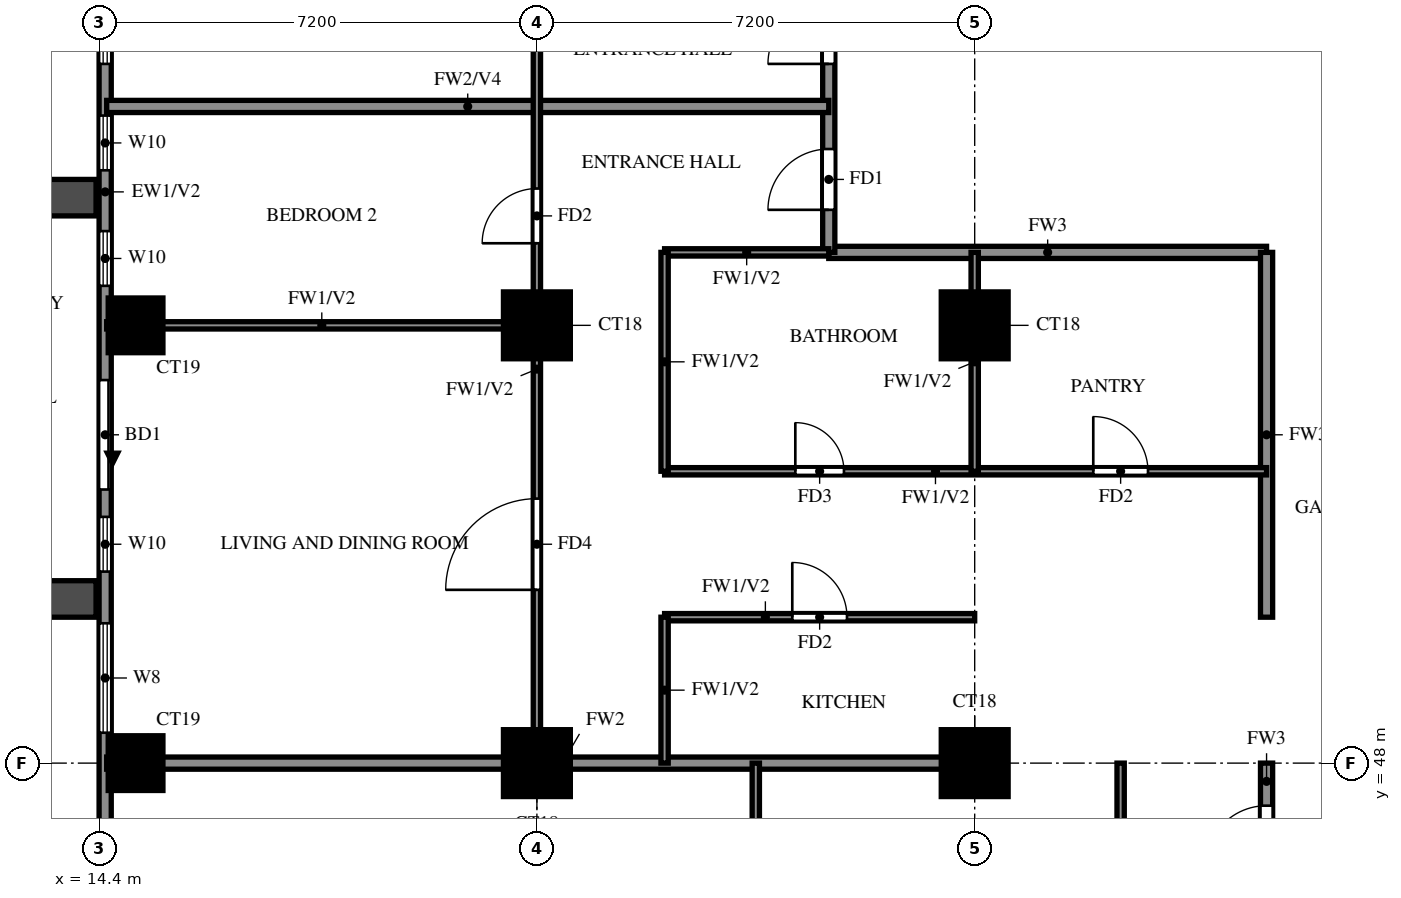
"""IFC4 building model, lengths in metres.
Left out: names, types, materials, properties, quantities, classifications, styles, units other than length and angle.
Written with IfcOpenShell. Run it as: python <this file> out.ifc"""

import sys

from ifc_helpers import new_model, si_unit, direction, frame, frame_2d, origin, origin_2d, place, context, subcontext, project, spatial, rectangle, extrude, source, transform, mapped, element, fill, save


model = new_model("IFC4")
c1 = context("Model", 3, precision=1e-05, world=origin(), true_north=direction((0.0, 1.0)))
c2 = subcontext(c1, "Body", "Model", "MODEL_VIEW")
j1 = project(units=[si_unit("LENGTHUNIT", "METRE"), si_unit("PLANEANGLEUNIT", "RADIAN")], contexts=[c1])
p1 = place(None, origin())
s1 = spatial("IfcSite", under=j1, at=p1, CompositionType="ELEMENT")
p2 = place(p1, origin())
s2 = spatial("IfcBuilding", under=s1, at=p2, CompositionType="ELEMENT")
p3 = place(p2, frame((0.0, 0.0, 127.0)))
s3 = spatial("IfcBuildingStorey", under=s2, at=p3, CompositionType="ELEMENT", Elevation=127.0)
m1 = source(origin(), c2, "Body", "SweptSolid", [
    extrude(rectangle(XDim=0.9, YDim=0.9, at=origin_2d()), origin(), (0.0, 0.0, 1.0), 3.2),
])
p4 = place(p3, frame((15.0, 48.0, 0.0), z_axis=(0.0, 0.0, 1.0), x_axis=(1.0, 0.0, 0.0)))
e1 = element("IfcColumn", 1, at=p4, inside=s3, PredefinedType="COLUMN", context=c2, shape_type="MappedRepresentation", body=[
    mapped(m1, transform((0.0, 0.0, 0.0))),
])
m2 = source(origin(), c2, "Body", "SweptSolid", [
    extrude(rectangle(XDim=1.1, YDim=1.1, at=origin_2d()), origin(), (0.0, 0.0, 1.0), 3.2),
])
for number, where, z_axis, x_axis in (
    (2, (21.6, 48.0, 0.0), (0.0, 0.0, 1.0), (1.0, 0.0, 0.0)),
    (3, (28.8, 48.0, 0.0), (0.0, 0.0, 1.0), (1.0, 0.0, 0.0)),
):
    element("IfcColumn", number, at=place(p3, frame(where, z_axis=z_axis, x_axis=x_axis)), inside=s3, PredefinedType="COLUMN", context=c2, shape_type="MappedRepresentation", body=[
        mapped(m2, transform((0.0, 0.0, 0.0))),
    ])
p5 = place(p3, frame((15.0, 55.2, 0.0), z_axis=(0.0, 0.0, 1.0), x_axis=(1.0, 0.0, 0.0)))
e4 = element("IfcColumn", 4, at=p5, inside=s3, PredefinedType="COLUMN", context=c2, shape_type="MappedRepresentation", body=[
    mapped(m1, transform((0.0, 0.0, 0.0))),
])
for number, where, z_axis, x_axis in (
    (5, (21.6, 55.2, 0.0), (0.0, 0.0, 1.0), (1.0, 0.0, 0.0)),
    (6, (28.8, 55.2, 0.0), (0.0, 0.0, 1.0), (1.0, 0.0, 0.0)),
):
    element("IfcColumn", number, at=place(p3, frame(where, z_axis=z_axis, x_axis=x_axis)), inside=s3, PredefinedType="COLUMN", context=c2, shape_type="MappedRepresentation", body=[
        mapped(m2, transform((0.0, 0.0, 0.0))),
    ])
p6 = place(p3, frame((14.5, 76.6, 0.0), z_axis=(0.0, 0.0, 1.0), x_axis=(0.0, -1.0, 0.0)))
e7 = element("IfcWall", 7, at=p6, inside=s3, PredefinedType="SOLIDWALL", context=c2, shape_type="SweptSolid", body=[
    extrude(rectangle(XDim=33.4, YDim=0.2, at=frame_2d((16.7, 0.0))), origin(), (0.0, 0.0, 1.0), 3.2),
])
p7 = place(p6, frame((7.9, 0.0, 0.0)))
e8 = element("IfcOpeningElement", 8, at=p7, cuts=e7, PredefinedType="OPENING", context=c2, shape_type="SweptSolid", body=[
    extrude(rectangle(XDim=1.8, YDim=2.4, at=frame_2d((0.9, 1.2))), frame((0.0, 0.11, 0.0), z_axis=(0.0, -1.0, 0.0), x_axis=(1.0, 0.0, 0.0)), (0.0, 0.0, 1.0), 0.22),
])
p8 = place(p6, frame((22.3, 0.0, 0.0)))
e9 = element("IfcOpeningElement", 9, at=p8, cuts=e7, PredefinedType="OPENING", context=c2, shape_type="SweptSolid", body=[
    extrude(rectangle(XDim=1.8, YDim=2.4, at=frame_2d((0.9, 1.2))), frame((0.0, 0.11, 0.0), z_axis=(0.0, -1.0, 0.0), x_axis=(1.0, 0.0, 0.0)), (0.0, 0.0, 1.0), 0.22),
])
p9 = place(p6, frame((29.9, 0.0, 0.6)))
e10 = element("IfcOpeningElement", 10, at=p9, cuts=e7, PredefinedType="OPENING", context=c2, shape_type="SweptSolid", body=[
    extrude(rectangle(XDim=2.4, YDim=2.4, at=frame_2d((1.2, 1.2))), frame((0.0, 0.11, 0.0), z_axis=(0.0, -1.0, 0.0), x_axis=(1.0, 0.0, 0.0)), (0.0, 0.0, 1.0), 0.22),
])
p10 = place(p6, frame((24.55, 0.0, 0.6)))
e11 = element("IfcOpeningElement", 11, at=p10, cuts=e7, PredefinedType="OPENING", context=c2, shape_type="SweptSolid", body=[
    extrude(rectangle(XDim=0.9, YDim=2.4, at=frame_2d((0.45, 1.2))), frame((0.0, 0.11, 0.0), z_axis=(0.0, -1.0, 0.0), x_axis=(1.0, 0.0, 0.0)), (0.0, 0.0, 1.0), 0.22),
])
p11 = place(p6, frame((26.3, 0.0, 0.6)))
e12 = element("IfcOpeningElement", 12, at=p11, cuts=e7, PredefinedType="OPENING", context=c2, shape_type="SweptSolid", body=[
    extrude(rectangle(XDim=1.8, YDim=2.4, at=frame_2d((0.9, 1.2))), frame((0.0, 0.11, 0.0), z_axis=(0.0, -1.0, 0.0), x_axis=(1.0, 0.0, 0.0)), (0.0, 0.0, 1.0), 0.22),
])
p12 = place(p6, frame((17.95, 0.0, 0.6)))
e13 = element("IfcOpeningElement", 13, at=p12, cuts=e7, PredefinedType="OPENING", context=c2, shape_type="SweptSolid", body=[
    extrude(rectangle(XDim=0.9, YDim=2.4, at=frame_2d((0.45, 1.2))), frame((0.0, 0.11, 0.0), z_axis=(0.0, -1.0, 0.0), x_axis=(1.0, 0.0, 0.0)), (0.0, 0.0, 1.0), 0.22),
])
p13 = place(p6, frame((19.85, 0.0, 0.6)))
e14 = element("IfcOpeningElement", 14, at=p13, cuts=e7, PredefinedType="OPENING", context=c2, shape_type="SweptSolid", body=[
    extrude(rectangle(XDim=0.9, YDim=2.4, at=frame_2d((0.45, 1.2))), frame((0.0, 0.11, 0.0), z_axis=(0.0, -1.0, 0.0), x_axis=(1.0, 0.0, 0.0)), (0.0, 0.0, 1.0), 0.22),
])
p14 = place(p6, frame((15.3, 0.0, 0.6)))
e15 = element("IfcOpeningElement", 15, at=p14, cuts=e7, PredefinedType="OPENING", context=c2, shape_type="SweptSolid", body=[
    extrude(rectangle(XDim=1.8, YDim=2.4, at=frame_2d((0.9, 1.2))), frame((0.0, 0.11, 0.0), z_axis=(0.0, -1.0, 0.0), x_axis=(1.0, 0.0, 0.0)), (0.0, 0.0, 1.0), 0.22),
])
p15 = place(p6, frame((12.35, 0.0, 1.5)))
e16 = element("IfcOpeningElement", 16, at=p15, cuts=e7, PredefinedType="OPENING", context=c2, shape_type="SweptSolid", body=[
    extrude(rectangle(XDim=0.9, YDim=0.9, at=frame_2d((0.45, 0.45))), frame((0.0, 0.11, 0.0), z_axis=(0.0, -1.0, 0.0), x_axis=(1.0, 0.0, 0.0)), (0.0, 0.0, 1.0), 0.22),
])
p16 = place(p6, frame((3.55, 0.0, 0.6)))
e17 = element("IfcOpeningElement", 17, at=p16, cuts=e7, PredefinedType="OPENING", context=c2, shape_type="SweptSolid", body=[
    extrude(rectangle(XDim=0.9, YDim=2.4, at=frame_2d((0.45, 1.2))), frame((0.0, 0.11, 0.0), z_axis=(0.0, -1.0, 0.0), x_axis=(1.0, 0.0, 0.0)), (0.0, 0.0, 1.0), 0.22),
])
p17 = place(p6, frame((5.3, 0.0, 0.6)))
e18 = element("IfcOpeningElement", 18, at=p17, cuts=e7, PredefinedType="OPENING", context=c2, shape_type="SweptSolid", body=[
    extrude(rectangle(XDim=1.2, YDim=2.4, at=frame_2d((0.6, 1.2))), frame((0.0, 0.11, 0.0), z_axis=(0.0, -1.0, 0.0), x_axis=(1.0, 0.0, 0.0)), (0.0, 0.0, 1.0), 0.22),
])
p18 = place(p6, frame((0.6, 0.0, 0.6)))
e19 = element("IfcOpeningElement", 19, at=p18, cuts=e7, PredefinedType="OPENING", context=c2, shape_type="SweptSolid", body=[
    extrude(rectangle(XDim=2.4, YDim=2.4, at=frame_2d((1.2, 1.2))), frame((0.0, 0.11, 0.0), z_axis=(0.0, -1.0, 0.0), x_axis=(1.0, 0.0, 0.0)), (0.0, 0.0, 1.0), 0.22),
])
for number, where, z_axis, x_axis in (
    (20, (14.35, 57.3, 0.0), (0.0, 0.0, 1.0), (-1.0, 0.0, 0.0)),
    (21, (14.35, 50.7, 0.0), (0.0, 0.0, 1.0), (-1.0, 0.0, 0.0)),
):
    element("IfcWall", number, at=place(p3, frame(where, z_axis=z_axis, x_axis=x_axis)), inside=s3, PredefinedType="SOLIDWALL", context=c2, shape_type="SweptSolid", body=[
        extrude(rectangle(XDim=2.65, YDim=0.6, at=frame_2d((1.325, 0.0))), origin(), (0.0, 0.0, 1.0), 2.85),
    ])
p19 = place(p3, frame((26.4, 56.4, 0.0), z_axis=(0.0, 0.0, 1.0), x_axis=(1.0, 0.0, 0.0)))
e22 = element("IfcWall", 22, at=p19, inside=s3, PredefinedType="SOLIDWALL", context=c2, shape_type="SweptSolid", body=[
    extrude(rectangle(XDim=7.2, YDim=0.2, at=frame_2d((3.6, 0.0))), origin(), (0.0, 0.0, 1.0), 3.2),
])
p20 = place(p3, frame((26.4, 56.4, 0.0), z_axis=(0.0, 0.0, 1.0), x_axis=(0.0, 1.0, 0.0)))
e23 = element("IfcWall", 23, at=p20, inside=s3, PredefinedType="SOLIDWALL", context=c2, shape_type="SweptSolid", body=[
    extrude(rectangle(XDim=9.6, YDim=0.2, at=frame_2d((4.8, 0.0))), origin(), (0.0, 0.0, 1.0), 3.2),
])
p21 = place(p20, frame((0.7, 0.0, 0.0)))
e24 = element("IfcOpeningElement", 24, at=p21, cuts=e23, PredefinedType="OPENING", context=c2, shape_type="SweptSolid", body=[
    extrude(rectangle(XDim=1.0, YDim=2.1, at=frame_2d((0.5, 1.05))), frame((0.0, 0.11, 0.0), z_axis=(0.0, -1.0, 0.0), x_axis=(1.0, 0.0, 0.0)), (0.0, 0.0, 1.0), 0.22),
])
p22 = place(p20, frame((3.1, 0.0, 0.0)))
e25 = element("IfcOpeningElement", 25, at=p22, cuts=e23, PredefinedType="OPENING", context=c2, shape_type="SweptSolid", body=[
    extrude(rectangle(XDim=1.0, YDim=2.1, at=frame_2d((0.5, 1.05))), frame((0.0, 0.11, 0.0), z_axis=(0.0, -1.0, 0.0), x_axis=(1.0, 0.0, 0.0)), (0.0, 0.0, 1.0), 0.22),
])
p23 = place(p3, frame((33.6, 45.6, 0.0), z_axis=(0.0, 0.0, 1.0), x_axis=(0.0, 1.0, 0.0)))
e26 = element("IfcWall", 26, at=p23, inside=s3, PredefinedType="SOLIDWALL", context=c2, shape_type="SweptSolid", body=[
    extrude(rectangle(XDim=2.4, YDim=0.2, at=frame_2d((1.2, 0.0))), origin(), (0.0, 0.0, 1.0), 3.2),
])
p24 = place(p23, frame((0.7, 0.0, 0.0)))
e27 = element("IfcOpeningElement", 27, at=p24, cuts=e26, PredefinedType="OPENING", context=c2, shape_type="SweptSolid", body=[
    extrude(rectangle(XDim=1.0, YDim=2.1, at=frame_2d((0.5, 1.05))), frame((0.0, 0.11, 0.0), z_axis=(0.0, -1.0, 0.0), x_axis=(1.0, 0.0, 0.0)), (0.0, 0.0, 1.0), 0.22),
])
p25 = place(p3, frame((33.6, 50.4, 0.0), z_axis=(0.0, 0.0, 1.0), x_axis=(0.0, 1.0, 0.0)))
e28 = element("IfcWall", 28, at=p25, inside=s3, PredefinedType="SOLIDWALL", context=c2, shape_type="SweptSolid", body=[
    extrude(rectangle(XDim=6.0, YDim=0.2, at=frame_2d((3.0, 0.0))), origin(), (0.0, 0.0, 1.0), 3.2),
])
p26 = place(p3, frame((14.525, 48.0, 0.0), z_axis=(0.0, 0.0, 1.0), x_axis=(1.0, 0.0, 0.0)))
e29 = element("IfcWall", 29, at=p26, inside=s3, PredefinedType="SOLIDWALL", context=c2, shape_type="SweptSolid", body=[
    extrude(rectangle(XDim=14.275, YDim=0.2, at=frame_2d((7.138, 0.0))), origin(), (0.0, 0.0, 1.0), 3.2),
])
p27 = place(p3, frame((14.525, 58.8, 0.0), z_axis=(0.0, 0.0, 1.0), x_axis=(1.0, 0.0, 0.0)))
e30 = element("IfcWall", 30, at=p27, inside=s3, PredefinedType="SOLIDWALL", context=c2, shape_type="SweptSolid", body=[
    extrude(rectangle(XDim=11.875, YDim=0.2, at=frame_2d((5.938, 0.0))), origin(), (0.0, 0.0, 1.0), 2.3),
])
p28 = place(p3, frame((23.7, 50.4, 0.0), z_axis=(0.0, 0.0, 1.0), x_axis=(1.0, 0.0, 0.0)))
e31 = element("IfcWall", 31, at=p28, inside=s3, PredefinedType="PARTITIONING", context=c2, shape_type="SweptSolid", body=[
    extrude(rectangle(XDim=5.1, YDim=0.12, at=frame_2d((2.55, 0.0))), origin(), (0.0, 0.0, 1.0), 3.2),
])
p29 = place(p28, frame((2.1, 0.0, 0.0)))
e32 = element("IfcOpeningElement", 32, at=p29, cuts=e31, PredefinedType="OPENING", context=c2, shape_type="SweptSolid", body=[
    extrude(rectangle(XDim=0.9, YDim=2.1, at=frame_2d((0.45, 1.05))), frame((0.0, 0.07, 0.0), z_axis=(0.0, -1.0, 0.0), x_axis=(1.0, 0.0, 0.0)), (0.0, 0.0, 1.0), 0.14),
])
p30 = place(p3, frame((23.7, 52.8, 0.0), z_axis=(0.0, 0.0, 1.0), x_axis=(1.0, 0.0, 0.0)))
e33 = element("IfcWall", 33, at=p30, inside=s3, PredefinedType="PARTITIONING", context=c2, shape_type="SweptSolid", body=[
    extrude(rectangle(XDim=9.9, YDim=0.12, at=frame_2d((4.95, 0.0))), origin(), (0.0, 0.0, 1.0), 3.2),
])
p31 = place(p30, frame((2.15, 0.0, 0.0)))
e34 = element("IfcOpeningElement", 34, at=p31, cuts=e33, PredefinedType="OPENING", context=c2, shape_type="SweptSolid", body=[
    extrude(rectangle(XDim=0.8, YDim=2.1, at=frame_2d((0.4, 1.05))), frame((0.0, 0.07, 0.0), z_axis=(0.0, -1.0, 0.0), x_axis=(1.0, 0.0, 0.0)), (0.0, 0.0, 1.0), 0.14),
])
p32 = place(p30, frame((7.05, 0.0, 0.0)))
e35 = element("IfcOpeningElement", 35, at=p32, cuts=e33, PredefinedType="OPENING", context=c2, shape_type="SweptSolid", body=[
    extrude(rectangle(XDim=0.9, YDim=2.1, at=frame_2d((0.45, 1.05))), frame((0.0, 0.07, 0.0), z_axis=(0.0, -1.0, 0.0), x_axis=(1.0, 0.0, 0.0)), (0.0, 0.0, 1.0), 0.14),
])
p33 = place(p3, frame((14.525, 55.2, 0.0), z_axis=(0.0, 0.0, 1.0), x_axis=(1.0, 0.0, 0.0)))
e36 = element("IfcWall", 36, at=p33, inside=s3, PredefinedType="PARTITIONING", context=c2, shape_type="SweptSolid", body=[
    extrude(rectangle(XDim=7.075, YDim=0.12, at=frame_2d((3.538, 0.0))), origin(), (0.0, 0.0, 1.0), 3.2),
])
p34 = place(p3, frame((23.7, 56.4, 0.0), z_axis=(0.0, 0.0, 1.0), x_axis=(1.0, 0.0, 0.0)))
e37 = element("IfcWall", 37, at=p34, inside=s3, PredefinedType="PARTITIONING", context=c2, shape_type="SweptSolid", body=[
    extrude(rectangle(XDim=2.7, YDim=0.12, at=frame_2d((1.35, 0.0))), origin(), (0.0, 0.0, 1.0), 3.2),
])
p35 = place(p3, frame((21.6, 48.0, 0.0), z_axis=(0.0, 0.0, 1.0), x_axis=(0.0, 1.0, 0.0)))
e38 = element("IfcWall", 38, at=p35, inside=s3, PredefinedType="PARTITIONING", context=c2, shape_type="SweptSolid", body=[
    extrude(rectangle(XDim=14.4, YDim=0.12, at=frame_2d((7.2, 0.0))), origin(), (0.0, 0.0, 1.0), 3.2),
])
p36 = place(p35, frame((2.85, 0.0, 0.0)))
e39 = element("IfcOpeningElement", 39, at=p36, cuts=e38, PredefinedType="OPENING", context=c2, shape_type="SweptSolid", body=[
    extrude(rectangle(XDim=1.5, YDim=2.1, at=frame_2d((0.75, 1.05))), frame((0.0, 0.07, 0.0), z_axis=(0.0, -1.0, 0.0), x_axis=(1.0, 0.0, 0.0)), (0.0, 0.0, 1.0), 0.14),
])
p37 = place(p35, frame((8.55, 0.0, 0.0)))
e40 = element("IfcOpeningElement", 40, at=p37, cuts=e38, PredefinedType="OPENING", context=c2, shape_type="SweptSolid", body=[
    extrude(rectangle(XDim=0.9, YDim=2.1, at=frame_2d((0.45, 1.05))), frame((0.0, 0.07, 0.0), z_axis=(0.0, -1.0, 0.0), x_axis=(1.0, 0.0, 0.0)), (0.0, 0.0, 1.0), 0.14),
])
p38 = place(p35, frame((12.15, 0.0, 0.0)))
e41 = element("IfcOpeningElement", 41, at=p38, cuts=e38, PredefinedType="OPENING", context=c2, shape_type="SweptSolid", body=[
    extrude(rectangle(XDim=0.9, YDim=2.1, at=frame_2d((0.45, 1.05))), frame((0.0, 0.07, 0.0), z_axis=(0.0, -1.0, 0.0), x_axis=(1.0, 0.0, 0.0)), (0.0, 0.0, 1.0), 0.14),
])
p39 = place(p3, frame((23.7, 48.0, 0.0), z_axis=(0.0, 0.0, 1.0), x_axis=(0.0, 1.0, 0.0)))
e42 = element("IfcWall", 42, at=p39, inside=s3, PredefinedType="PARTITIONING", context=c2, shape_type="SweptSolid", body=[
    extrude(rectangle(XDim=2.4, YDim=0.12, at=frame_2d((1.2, 0.0))), origin(), (0.0, 0.0, 1.0), 3.2),
])
p40 = place(p3, frame((23.7, 52.8, 0.0), z_axis=(0.0, 0.0, 1.0), x_axis=(0.0, 1.0, 0.0)))
e43 = element("IfcWall", 43, at=p40, inside=s3, PredefinedType="PARTITIONING", context=c2, shape_type="SweptSolid", body=[
    extrude(rectangle(XDim=3.6, YDim=0.12, at=frame_2d((1.8, 0.0))), origin(), (0.0, 0.0, 1.0), 3.2),
])
p41 = place(p3, frame((25.2, 39.725, 0.0), z_axis=(0.0, 0.0, 1.0), x_axis=(0.0, 1.0, 0.0)))
e44 = element("IfcWall", 44, at=p41, inside=s3, PredefinedType="PARTITIONING", context=c2, shape_type="SweptSolid", body=[
    extrude(rectangle(XDim=8.275, YDim=0.12, at=frame_2d((4.137, 0.0))), origin(), (0.0, 0.0, 1.0), 3.2),
])
p42 = place(p41, frame((4.525, 0.0, 0.0)))
e45 = element("IfcOpeningElement", 45, at=p42, cuts=e44, PredefinedType="OPENING", context=c2, shape_type="SweptSolid", body=[
    extrude(rectangle(XDim=0.9, YDim=2.1, at=frame_2d((0.45, 1.05))), frame((0.0, 0.07, 0.0), z_axis=(0.0, -1.0, 0.0), x_axis=(1.0, 0.0, 0.0)), (0.0, 0.0, 1.0), 0.14),
])
p43 = place(p3, frame((28.8, 52.8, 0.0), z_axis=(0.0, 0.0, 1.0), x_axis=(0.0, 1.0, 0.0)))
e46 = element("IfcWall", 46, at=p43, inside=s3, PredefinedType="PARTITIONING", context=c2, shape_type="SweptSolid", body=[
    extrude(rectangle(XDim=3.6, YDim=0.12, at=frame_2d((1.8, 0.0))), origin(), (0.0, 0.0, 1.0), 3.2),
])
p44 = place(p3, frame((31.2, 45.6, 0.0), z_axis=(0.0, 0.0, 1.0), x_axis=(0.0, 1.0, 0.0)))
e47 = element("IfcWall", 47, at=p44, inside=s3, PredefinedType="PARTITIONING", context=c2, shape_type="SweptSolid", body=[
    extrude(rectangle(XDim=2.4, YDim=0.12, at=frame_2d((1.2, 0.0))), origin(), (0.0, 0.0, 1.0), 3.2),
])
p45 = place(p8, origin())
e48 = element("IfcDoor", 48, at=p45, inside=s3, OperationType="DOUBLE_DOOR_SLIDING", PredefinedType="DOOR", context=c2, shape_type="SweptSolid", body=[
    extrude(rectangle(XDim=1.8, YDim=2.4, at=frame_2d((0.9, 1.2))), frame((0.0, 0.025, 0.0), z_axis=(0.0, -1.0, 0.0), x_axis=(1.0, 0.0, 0.0)), (0.0, 0.0, 1.0), 0.05),
])
fill(e9, e48)
p46 = place(p10, origin())
e49 = element("IfcWindow", 49, at=p46, inside=s3, PartitioningType="SINGLE_PANEL", PredefinedType="WINDOW", context=c2, shape_type="SweptSolid", body=[
    extrude(rectangle(XDim=0.9, YDim=2.4, at=frame_2d((0.45, 1.2))), frame((0.0, 0.03, 0.0), z_axis=(0.0, -1.0, 0.0), x_axis=(1.0, 0.0, 0.0)), (0.0, 0.0, 1.0), 0.06),
])
fill(e11, e49)
p47 = place(p11, origin())
e50 = element("IfcWindow", 50, at=p47, inside=s3, PartitioningType="DOUBLE_PANEL_VERTICAL", PredefinedType="WINDOW", context=c2, shape_type="SweptSolid", body=[
    extrude(rectangle(XDim=1.8, YDim=2.4, at=frame_2d((0.9, 1.2))), frame((0.0, 0.03, 0.0), z_axis=(0.0, -1.0, 0.0), x_axis=(1.0, 0.0, 0.0)), (0.0, 0.0, 1.0), 0.06),
])
fill(e12, e50)
p48 = place(p12, origin())
e51 = element("IfcWindow", 51, at=p48, inside=s3, PartitioningType="SINGLE_PANEL", PredefinedType="WINDOW", context=c2, shape_type="SweptSolid", body=[
    extrude(rectangle(XDim=0.9, YDim=2.4, at=frame_2d((0.45, 1.2))), frame((0.0, 0.03, 0.0), z_axis=(0.0, -1.0, 0.0), x_axis=(1.0, 0.0, 0.0)), (0.0, 0.0, 1.0), 0.06),
])
fill(e13, e51)
p49 = place(p13, origin())
e52 = element("IfcWindow", 52, at=p49, inside=s3, PartitioningType="SINGLE_PANEL", PredefinedType="WINDOW", context=c2, shape_type="SweptSolid", body=[
    extrude(rectangle(XDim=0.9, YDim=2.4, at=frame_2d((0.45, 1.2))), frame((0.0, 0.03, 0.0), z_axis=(0.0, -1.0, 0.0), x_axis=(1.0, 0.0, 0.0)), (0.0, 0.0, 1.0), 0.06),
])
fill(e14, e52)
p50 = place(p14, origin())
e53 = element("IfcWindow", 53, at=p50, inside=s3, PartitioningType="DOUBLE_PANEL_VERTICAL", PredefinedType="WINDOW", context=c2, shape_type="SweptSolid", body=[
    extrude(rectangle(XDim=1.8, YDim=2.4, at=frame_2d((0.9, 1.2))), frame((0.0, 0.03, 0.0), z_axis=(0.0, -1.0, 0.0), x_axis=(1.0, 0.0, 0.0)), (0.0, 0.0, 1.0), 0.06),
])
fill(e15, e53)
p51 = place(p24, origin())
e54 = element("IfcDoor", 54, at=p51, inside=s3, OperationType="SINGLE_SWING_RIGHT", PredefinedType="DOOR", context=c2, shape_type="SweptSolid", body=[
    extrude(rectangle(XDim=1.0, YDim=2.1, at=frame_2d((0.5, 1.05))), frame((0.0, 0.025, 0.0), z_axis=(0.0, -1.0, 0.0), x_axis=(1.0, 0.0, 0.0)), (0.0, 0.0, 1.0), 0.05),
])
fill(e27, e54)
p52 = place(p21, origin())
e55 = element("IfcDoor", 55, at=p52, inside=s3, OperationType="SINGLE_SWING_RIGHT", PredefinedType="DOOR", context=c2, shape_type="SweptSolid", body=[
    extrude(rectangle(XDim=1.0, YDim=2.1, at=frame_2d((0.5, 1.05))), frame((0.0, 0.025, 0.0), z_axis=(0.0, -1.0, 0.0), x_axis=(1.0, 0.0, 0.0)), (0.0, 0.0, 1.0), 0.05),
])
fill(e24, e55)
p53 = place(p36, origin())
e56 = element("IfcDoor", 56, at=p53, inside=s3, OperationType="SINGLE_SWING_LEFT", PredefinedType="DOOR", context=c2, shape_type="SweptSolid", body=[
    extrude(rectangle(XDim=1.5, YDim=2.1, at=frame_2d((0.75, 1.05))), frame((0.0, 0.025, 0.0), z_axis=(0.0, -1.0, 0.0), x_axis=(1.0, 0.0, 0.0)), (0.0, 0.0, 1.0), 0.05),
])
fill(e39, e56)
p54 = place(p37, origin())
e57 = element("IfcDoor", 57, at=p54, inside=s3, OperationType="SINGLE_SWING_LEFT", PredefinedType="DOOR", context=c2, shape_type="SweptSolid", body=[
    extrude(rectangle(XDim=0.9, YDim=2.1, at=frame_2d((0.45, 1.05))), frame((0.0, 0.025, 0.0), z_axis=(0.0, -1.0, 0.0), x_axis=(1.0, 0.0, 0.0)), (0.0, 0.0, 1.0), 0.05),
])
fill(e40, e57)
p55 = place(p29, origin())
e58 = element("IfcDoor", 58, at=p55, inside=s3, OperationType="SINGLE_SWING_RIGHT", PredefinedType="DOOR", context=c2, shape_type="SweptSolid", body=[
    extrude(rectangle(XDim=0.9, YDim=2.1, at=frame_2d((0.45, 1.05))), frame((0.0, 0.025, 0.0), z_axis=(0.0, -1.0, 0.0), x_axis=(1.0, 0.0, 0.0)), (0.0, 0.0, 1.0), 0.05),
])
fill(e32, e58)
p56 = place(p31, origin())
e59 = element("IfcDoor", 59, at=p56, inside=s3, OperationType="SINGLE_SWING_LEFT", PredefinedType="DOOR", context=c2, shape_type="SweptSolid", body=[
    extrude(rectangle(XDim=0.8, YDim=2.1, at=frame_2d((0.4, 1.05))), frame((0.0, 0.025, 0.0), z_axis=(0.0, -1.0, 0.0), x_axis=(1.0, 0.0, 0.0)), (0.0, 0.0, 1.0), 0.05),
])
fill(e34, e59)
p57 = place(p32, origin())
e60 = element("IfcDoor", 60, at=p57, inside=s3, OperationType="SINGLE_SWING_LEFT", PredefinedType="DOOR", context=c2, shape_type="SweptSolid", body=[
    extrude(rectangle(XDim=0.9, YDim=2.1, at=frame_2d((0.45, 1.05))), frame((0.0, 0.025, 0.0), z_axis=(0.0, -1.0, 0.0), x_axis=(1.0, 0.0, 0.0)), (0.0, 0.0, 1.0), 0.05),
])
fill(e35, e60)
p58 = place(p22, origin())
e61 = element("IfcDoor", 61, at=p58, inside=s3, OperationType="SINGLE_SWING_RIGHT", PredefinedType="DOOR", context=c2, shape_type="SweptSolid", body=[
    extrude(rectangle(XDim=1.0, YDim=2.1, at=frame_2d((0.5, 1.05))), frame((0.0, 0.025, 0.0), z_axis=(0.0, -1.0, 0.0), x_axis=(1.0, 0.0, 0.0)), (0.0, 0.0, 1.0), 0.05),
])
fill(e25, e61)
save(model, sys.argv[1])
